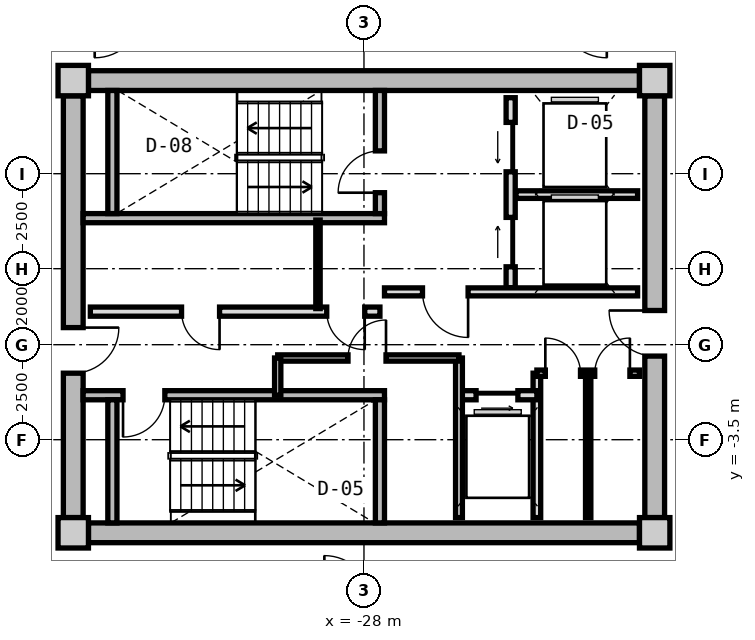
"""IFC4 building model, lengths in metres.
Left out: names, types, materials, properties, quantities, classifications, styles, units other than length and angle.
Written with IfcOpenShell. Run it as: python <this file> out.ifc"""

import sys

from ifc_helpers import new_model, si_unit, direction, frame, frame_2d, origin, origin_2d, place, context, subcontext, project, spatial, rectangle, extrude, source, transform, mapped, element, fill, save


model = new_model("IFC4")
c1 = context("Model", 3, precision=1e-05, world=origin(), true_north=direction((0.0, 1.0)))
c2 = subcontext(c1, "Body", "Model", "MODEL_VIEW")
j1 = project(units=[si_unit("LENGTHUNIT", "METRE"), si_unit("PLANEANGLEUNIT", "RADIAN")], contexts=[c1])
p1 = place(None, origin())
s1 = spatial("IfcSite", under=j1, at=p1, CompositionType="ELEMENT")
p2 = place(p1, origin())
s2 = spatial("IfcBuilding", under=s1, at=p2, CompositionType="ELEMENT")
p3 = place(p2, frame((0.0, 0.0, 241.35)))
s3 = spatial("IfcBuildingStorey", under=s2, at=p3, CompositionType="ELEMENT", Elevation=241.35)
m1 = source(origin(), c2, "Body", "SweptSolid", [
    extrude(rectangle(XDim=0.8, YDim=0.8, at=origin_2d()), origin(), (0.0, 0.0, 1.0), 3.05),
])
for number, where, z_axis, x_axis in (
    (1, (-35.65, -5.95, 0.0), (0.0, 0.0, 1.0), (1.0, 0.0, 0.0)),
    (2, (-20.35, -5.95, 0.0), (0.0, 0.0, 1.0), (1.0, 0.0, 0.0)),
    (3, (-20.35, 5.95, 0.0), (0.0, 0.0, 1.0), (1.0, 0.0, 0.0)),
    (4, (-35.65, 5.95, 0.0), (0.0, 0.0, 1.0), (1.0, 0.0, 0.0)),
):
    element("IfcColumn", number, at=place(p3, frame(where, z_axis=z_axis, x_axis=x_axis)), inside=s3, PredefinedType="COLUMN", context=c2, shape_type="MappedRepresentation", body=[
        mapped(m1, transform((0.0, 0.0, 0.0), x_axis=(1.0, 0.0, 0.0), y_axis=(0.0, 1.0, 0.0), z_axis=(0.0, 0.0, 1.0), scale=1.0)),
    ])
m2 = source(origin(), c2, "Body", "SweptSolid", [
    extrude(rectangle(XDim=14.5, YDim=0.52, at=frame_2d((7.25, 0.0))), origin(), (0.0, 0.0, 1.0), 2.73),
])
for number, where, z_axis, x_axis in (
    (5, (-35.25, 5.95, 0.0), (0.0, 0.0, 1.0), (1.0, 0.0, 0.0)),
    (6, (-20.75, -5.95, 0.0), (0.0, 0.0, 1.0), (-1.0, 0.0, 0.0)),
):
    element("IfcWall", number, at=place(p3, frame(where, z_axis=z_axis, x_axis=x_axis)), inside=s3, PredefinedType="SHEAR", context=c2, shape_type="MappedRepresentation", body=[
        mapped(m2, transform((0.0, 0.0, 0.0), x_axis=(1.0, 0.0, 0.0), y_axis=(0.0, 1.0, 0.0), z_axis=(0.0, 0.0, 1.0), scale=1.0)),
    ])
m3 = source(origin(), c2, "Body", "SweptSolid", [
    extrude(rectangle(XDim=11.1, YDim=0.52, at=frame_2d((5.55, 0.0))), origin(), (0.0, 0.0, 1.0), 2.73),
])
p4 = place(p3, frame((-35.65, -5.55, 0.0), z_axis=(0.0, 0.0, 1.0), x_axis=(0.0, 1.0, 0.0)))
e7 = element("IfcWall", 7, at=p4, inside=s3, PredefinedType="SHEAR", context=c2, shape_type="MappedRepresentation", body=[
    mapped(m3, transform((0.0, 0.0, 0.0), x_axis=(1.0, 0.0, 0.0), y_axis=(0.0, 1.0, 0.0), z_axis=(0.0, 0.0, 1.0), scale=1.0)),
])
p5 = place(p4, frame((3.8, 0.0, 0.0)))
e8 = element("IfcOpeningElement", 8, at=p5, cuts=e7, PredefinedType="OPENING", context=c2, shape_type="SweptSolid", body=[
    extrude(rectangle(XDim=1.2, YDim=2.15, at=frame_2d((0.6, 1.075))), frame((0.0, 0.27, 0.0), z_axis=(0.0, -1.0, 0.0), x_axis=(1.0, 0.0, 0.0)), (0.0, 0.0, 1.0), 0.54),
])
p6 = place(p3, frame((-20.35, 5.55, 0.0), z_axis=(0.0, 0.0, 1.0), x_axis=(0.0, -1.0, 0.0)))
e9 = element("IfcWall", 9, at=p6, inside=s3, PredefinedType="SHEAR", context=c2, shape_type="MappedRepresentation", body=[
    mapped(m3, transform((0.0, 0.0, 0.0), x_axis=(1.0, 0.0, 0.0), y_axis=(0.0, 1.0, 0.0), z_axis=(0.0, 0.0, 1.0), scale=1.0)),
])
p7 = place(p6, frame((5.65, 0.0, 0.0)))
e10 = element("IfcOpeningElement", 10, at=p7, cuts=e9, PredefinedType="OPENING", context=c2, shape_type="SweptSolid", body=[
    extrude(rectangle(XDim=1.2, YDim=2.15, at=frame_2d((0.6, 1.075))), frame((0.0, 0.27, 0.0), z_axis=(0.0, -1.0, 0.0), x_axis=(1.0, 0.0, 0.0)), (0.0, 0.0, 1.0), 0.54),
])
m4 = source(origin(), c2, "Body", "SweptSolid", [
    extrude(rectangle(XDim=7.93, YDim=0.24, at=frame_2d((3.965, 0.0))), origin(), (0.0, 0.0, 1.0), 2.73),
])
p8 = place(p3, frame((-35.39, 2.33, 0.0), z_axis=(0.0, 0.0, 1.0), x_axis=(1.0, 0.0, 0.0)))
e11 = element("IfcWall", 11, at=p8, inside=s3, PredefinedType="PARTITIONING", context=c2, shape_type="MappedRepresentation", body=[
    mapped(m4, transform((0.0, 0.0, 0.0), x_axis=(1.0, 0.0, 0.0), y_axis=(0.0, 1.0, 0.0), z_axis=(0.0, 0.0, 1.0), scale=1.0)),
])
m5 = source(origin(), c2, "Body", "SweptSolid", [
    extrude(rectangle(XDim=3.24, YDim=0.24, at=frame_2d((1.62, 0.0))), origin(), (0.0, 0.0, 1.0), 2.73),
])
p9 = place(p3, frame((-34.62, 2.45, 0.0), z_axis=(0.0, 0.0, 1.0), x_axis=(0.0, 1.0, 0.0)))
e12 = element("IfcWall", 12, at=p9, inside=s3, PredefinedType="PARTITIONING", context=c2, shape_type="MappedRepresentation", body=[
    mapped(m5, transform((0.0, 0.0, 0.0), x_axis=(1.0, 0.0, 0.0), y_axis=(0.0, 1.0, 0.0), z_axis=(0.0, 0.0, 1.0), scale=1.0)),
])
p10 = place(p3, frame((-27.58, 2.45, 0.0), z_axis=(0.0, 0.0, 1.0), x_axis=(0.0, 1.0, 0.0)))
e13 = element("IfcWall", 13, at=p10, inside=s3, PredefinedType="PARTITIONING", context=c2, shape_type="MappedRepresentation", body=[
    mapped(m5, transform((0.0, 0.0, 0.0), x_axis=(1.0, 0.0, 0.0), y_axis=(0.0, 1.0, 0.0), z_axis=(0.0, 0.0, 1.0), scale=1.0)),
])
p11 = place(p10, frame((0.55, 0.0, 0.0)))
e14 = element("IfcOpeningElement", 14, at=p11, cuts=e13, PredefinedType="OPENING", context=c2, shape_type="SweptSolid", body=[
    extrude(rectangle(XDim=1.1, YDim=2.15, at=frame_2d((0.55, 1.075))), frame((0.0, 0.13, 0.0), z_axis=(0.0, -1.0, 0.0), x_axis=(1.0, 0.0, 0.0)), (0.0, 0.0, 1.0), 0.26),
])
p12 = place(p3, frame((-35.39, -2.33, 0.0), z_axis=(0.0, 0.0, 1.0), x_axis=(1.0, 0.0, 0.0)))
e15 = element("IfcWall", 15, at=p12, inside=s3, PredefinedType="PARTITIONING", context=c2, shape_type="MappedRepresentation", body=[
    mapped(m4, transform((0.0, 0.0, 0.0), x_axis=(1.0, 0.0, 0.0), y_axis=(0.0, 1.0, 0.0), z_axis=(0.0, 0.0, 1.0), scale=1.0)),
])
p13 = place(p12, frame((1.05, 0.0, 0.0)))
e16 = element("IfcOpeningElement", 16, at=p13, cuts=e15, PredefinedType="OPENING", context=c2, shape_type="SweptSolid", body=[
    extrude(rectangle(XDim=1.1, YDim=2.15, at=frame_2d((0.55, 1.075))), frame((0.0, 0.13, 0.0), z_axis=(0.0, -1.0, 0.0), x_axis=(1.0, 0.0, 0.0)), (0.0, 0.0, 1.0), 0.26),
])
for number, where, z_axis, x_axis in (
    (17, (-34.62, -5.69, 0.0), (0.0, 0.0, 1.0), (0.0, 1.0, 0.0)),
    (18, (-27.58, -5.69, 0.0), (0.0, 0.0, 1.0), (0.0, 1.0, 0.0)),
):
    element("IfcWall", number, at=place(p3, frame(where, z_axis=z_axis, x_axis=x_axis)), inside=s3, PredefinedType="PARTITIONING", context=c2, shape_type="MappedRepresentation", body=[
        mapped(m5, transform((0.0, 0.0, 0.0), x_axis=(1.0, 0.0, 0.0), y_axis=(0.0, 1.0, 0.0), z_axis=(0.0, 0.0, 1.0), scale=1.0)),
    ])
m6 = source(origin(), c2, "Body", "SweptSolid", [
    extrude(rectangle(XDim=5.0, YDim=0.24, at=frame_2d((2.5, 0.0))), origin(), (0.0, 0.0, 1.0), 2.715),
])
p14 = place(p3, frame((-24.14, 0.5, 0.0), z_axis=(0.0, 0.0, 1.0), x_axis=(0.0, 1.0, 0.0)))
e19 = element("IfcWall", 19, at=p14, inside=s3, PredefinedType="PARTITIONING", context=c2, shape_type="MappedRepresentation", body=[
    mapped(m6, transform((0.0, 0.0, 0.0), x_axis=(1.0, 0.0, 0.0), y_axis=(0.0, 1.0, 0.0), z_axis=(0.0, 0.0, 1.0), scale=1.0)),
])
p15 = place(p14, frame((3.05, 0.0, 0.0)))
e20 = element("IfcOpeningElement", 20, at=p15, cuts=e19, PredefinedType="OPENING", context=c2, shape_type="SweptSolid", body=[
    extrude(rectangle(XDim=1.3, YDim=2.2, at=frame_2d((0.65, 1.1))), frame((0.0, 0.13, 0.0), z_axis=(0.0, -1.0, 0.0), x_axis=(1.0, 0.0, 0.0)), (0.0, 0.0, 1.0), 0.26),
])
p16 = place(p14, frame((0.55, 0.0, 0.0)))
e21 = element("IfcOpeningElement", 21, at=p16, cuts=e19, PredefinedType="OPENING", context=c2, shape_type="SweptSolid", body=[
    extrude(rectangle(XDim=1.3, YDim=2.2, at=frame_2d((0.65, 1.1))), frame((0.0, 0.13, 0.0), z_axis=(0.0, -1.0, 0.0), x_axis=(1.0, 0.0, 0.0)), (0.0, 0.0, 1.0), 0.26),
])
m7 = source(origin(), c2, "Body", "SweptSolid", [
    extrude(rectangle(XDim=3.2, YDim=0.2, at=frame_2d((1.6, 0.0))), origin(), (0.0, 0.0, 1.0), 2.715),
])
p17 = place(p3, frame((-24.0, 2.95, 0.0), z_axis=(0.0, 0.0, 1.0), x_axis=(1.0, 0.0, 0.0)))
e22 = element("IfcWall", 22, at=p17, inside=s3, PredefinedType="PARTITIONING", context=c2, shape_type="MappedRepresentation", body=[
    mapped(m7, transform((0.0, 0.0, 0.0), x_axis=(1.0, 0.0, 0.0), y_axis=(0.0, 1.0, 0.0), z_axis=(0.0, 0.0, 1.0), scale=1.0)),
])
m8 = source(origin(), c2, "Body", "SweptSolid", [
    extrude(rectangle(XDim=6.66, YDim=0.21, at=frame_2d((3.33, 0.0))), origin(), (0.0, 0.0, 1.0), 2.715),
])
p18 = place(p3, frame((-27.46, 0.39, 0.0), z_axis=(0.0, 0.0, 1.0), x_axis=(1.0, 0.0, 0.0)))
e23 = element("IfcWall", 23, at=p18, inside=s3, PredefinedType="PARTITIONING", context=c2, shape_type="MappedRepresentation", body=[
    mapped(m8, transform((0.0, 0.0, 0.0), x_axis=(1.0, 0.0, 0.0), y_axis=(0.0, 1.0, 0.0), z_axis=(0.0, 0.0, 1.0), scale=1.0)),
])
p19 = place(p18, frame((1.0, 0.0, 0.0)))
e24 = element("IfcOpeningElement", 24, at=p19, cuts=e23, PredefinedType="OPENING", context=c2, shape_type="SweptSolid", body=[
    extrude(rectangle(XDim=1.2, YDim=2.15, at=frame_2d((0.6, 1.075))), frame((0.0, 0.115, 0.0), z_axis=(0.0, -1.0, 0.0), x_axis=(1.0, 0.0, 0.0)), (0.0, 0.0, 1.0), 0.23),
])
m9 = source(origin(), c2, "Body", "SweptSolid", [
    extrude(rectangle(XDim=7.62, YDim=0.24, at=frame_2d((3.81, 0.0))), origin(), (0.0, 0.0, 1.0), 2.715),
])
p20 = place(p3, frame((-35.2, -0.13, 0.0), z_axis=(0.0, 0.0, 1.0), x_axis=(1.0, 0.0, 0.0)))
e25 = element("IfcWall", 25, at=p20, inside=s3, PredefinedType="PARTITIONING", context=c2, shape_type="MappedRepresentation", body=[
    mapped(m9, transform((0.0, 0.0, 0.0), x_axis=(1.0, 0.0, 0.0), y_axis=(0.0, 1.0, 0.0), z_axis=(0.0, 0.0, 1.0), scale=1.0)),
])
p21 = place(p20, frame((6.22, 0.0, 0.0)))
e26 = element("IfcOpeningElement", 26, at=p21, cuts=e25, PredefinedType="OPENING", context=c2, shape_type="SweptSolid", body=[
    extrude(rectangle(XDim=1.0, YDim=2.1, at=frame_2d((0.5, 1.05))), frame((0.0, 0.13, 0.0), z_axis=(0.0, -1.0, 0.0), x_axis=(1.0, 0.0, 0.0)), (0.0, 0.0, 1.0), 0.26),
])
p22 = place(p20, frame((2.4, 0.0, 0.0)))
e27 = element("IfcOpeningElement", 27, at=p22, cuts=e25, PredefinedType="OPENING", context=c2, shape_type="SweptSolid", body=[
    extrude(rectangle(XDim=1.0, YDim=2.1, at=frame_2d((0.5, 1.05))), frame((0.0, 0.13, 0.0), z_axis=(0.0, -1.0, 0.0), x_axis=(1.0, 0.0, 0.0)), (0.0, 0.0, 1.0), 0.26),
])
m10 = source(origin(), c2, "Body", "SweptSolid", [
    extrude(rectangle(XDim=2.33, YDim=0.115, at=frame_2d((1.165, 0.0))), origin(), (0.0, 0.0, 1.0), 2.715),
])
p23 = place(p3, frame((-29.21, -0.05, 0.0), z_axis=(0.0, 0.0, 1.0), x_axis=(0.0, 1.0, 0.0)))
e28 = element("IfcWall", 28, at=p23, inside=s3, PredefinedType="PARTITIONING", context=c2, shape_type="MappedRepresentation", body=[
    mapped(m10, transform((0.0, 0.0, 0.0), x_axis=(1.0, 0.0, 0.0), y_axis=(0.0, 1.0, 0.0), z_axis=(0.0, 0.0, 1.0), scale=1.0)),
])
m11 = source(origin(), c2, "Body", "SweptSolid", [
    extrude(rectangle(XDim=3.8, YDim=0.2, at=frame_2d((1.9, 0.0))), origin(), (0.0, 0.0, 1.0), 2.715),
])
p24 = place(p3, frame((-23.45, -5.55, 0.0), z_axis=(0.0, 0.0, 1.0), x_axis=(0.0, 1.0, 0.0)))
e29 = element("IfcWall", 29, at=p24, inside=s3, PredefinedType="PARTITIONING", context=c2, shape_type="MappedRepresentation", body=[
    mapped(m11, transform((0.0, 0.0, 0.0), x_axis=(1.0, 0.0, 0.0), y_axis=(0.0, 1.0, 0.0), z_axis=(0.0, 0.0, 1.0), scale=1.0)),
])
m12 = source(origin(), c2, "Body", "SweptSolid", [
    extrude(rectangle(XDim=2.05, YDim=0.24, at=frame_2d((1.025, 0.0))), origin(), (0.0, 0.0, 1.0), 2.715),
])
p25 = place(p3, frame((-25.5, -2.33, 0.0), z_axis=(0.0, 0.0, 1.0), x_axis=(1.0, 0.0, 0.0)))
e30 = element("IfcWall", 30, at=p25, inside=s3, PredefinedType="PARTITIONING", context=c2, shape_type="MappedRepresentation", body=[
    mapped(m12, transform((0.0, 0.0, 0.0), x_axis=(1.0, 0.0, 0.0), y_axis=(0.0, 1.0, 0.0), z_axis=(0.0, 0.0, 1.0), scale=1.0)),
])
p26 = place(p25, frame((0.45, 0.0, 0.0)))
e31 = element("IfcOpeningElement", 31, at=p26, cuts=e30, PredefinedType="OPENING", context=c2, shape_type="SweptSolid", body=[
    extrude(rectangle(XDim=1.1, YDim=2.2, at=frame_2d((0.55, 1.1))), frame((0.0, 0.13, 0.0), z_axis=(0.0, -1.0, 0.0), x_axis=(1.0, 0.0, 0.0)), (0.0, 0.0, 1.0), 0.26),
])
m13 = source(origin(), c2, "Body", "SweptSolid", [
    extrude(rectangle(XDim=4.2, YDim=0.18, at=frame_2d((2.1, 0.0))), origin(), (0.0, 0.0, 1.0), 2.715),
])
p27 = place(p3, frame((-25.5, -5.55, 0.0), z_axis=(0.0, 0.0, 1.0), x_axis=(0.0, 1.0, 0.0)))
e32 = element("IfcWall", 32, at=p27, inside=s3, PredefinedType="PARTITIONING", context=c2, shape_type="MappedRepresentation", body=[
    mapped(m13, transform((0.0, 0.0, 0.0), x_axis=(1.0, 0.0, 0.0), y_axis=(0.0, 1.0, 0.0), z_axis=(0.0, 0.0, 1.0), scale=1.0)),
])
m14 = source(origin(), c2, "Body", "SweptSolid", [
    extrude(rectangle(XDim=4.77, YDim=0.165, at=frame_2d((2.385, 0.0))), origin(), (0.0, 0.0, 1.0), 2.715),
])
p28 = place(p3, frame((-30.27, -1.35, 0.0), z_axis=(0.0, 0.0, 1.0), x_axis=(1.0, 0.0, 0.0)))
e33 = element("IfcWall", 33, at=p28, inside=s3, PredefinedType="PARTITIONING", context=c2, shape_type="MappedRepresentation", body=[
    mapped(m14, transform((0.0, 0.0, 0.0), x_axis=(1.0, 0.0, 0.0), y_axis=(0.0, 1.0, 0.0), z_axis=(0.0, 0.0, 1.0), scale=1.0)),
])
p29 = place(p28, frame((1.85, 0.0, 0.0)))
e34 = element("IfcOpeningElement", 34, at=p29, cuts=e33, PredefinedType="OPENING", context=c2, shape_type="SweptSolid", body=[
    extrude(rectangle(XDim=1.0, YDim=2.1, at=frame_2d((0.5, 1.05))), frame((0.0, 0.093, 0.0), z_axis=(0.0, -1.0, 0.0), x_axis=(1.0, 0.0, 0.0)), (0.0, 0.0, 1.0), 0.185),
])
m15 = source(origin(), c2, "Body", "SweptSolid", [
    extrude(rectangle(XDim=0.98, YDim=0.165, at=frame_2d((0.49, 0.0))), origin(), (0.0, 0.0, 1.0), 2.715),
])
p30 = place(p3, frame((-30.27, -2.33, 0.0), z_axis=(0.0, 0.0, 1.0), x_axis=(0.0, 1.0, 0.0)))
e35 = element("IfcWall", 35, at=p30, inside=s3, PredefinedType="PARTITIONING", context=c2, shape_type="MappedRepresentation", body=[
    mapped(m15, transform((0.0, 0.0, 0.0), x_axis=(1.0, 0.0, 0.0), y_axis=(0.0, 1.0, 0.0), z_axis=(0.0, 0.0, 1.0), scale=1.0)),
])
m16 = source(origin(), c2, "Body", "SweptSolid", [
    extrude(rectangle(XDim=2.7, YDim=0.165, at=frame_2d((1.35, 0.0))), origin(), (0.0, 0.0, 1.0), 2.715),
])
p31 = place(p3, frame((-23.45, -1.75, 0.0), z_axis=(0.0, 0.0, 1.0), x_axis=(1.0, 0.0, 0.0)))
e36 = element("IfcWall", 36, at=p31, inside=s3, PredefinedType="PARTITIONING", context=c2, shape_type="MappedRepresentation", body=[
    mapped(m16, transform((0.0, 0.0, 0.0), x_axis=(1.0, 0.0, 0.0), y_axis=(0.0, 1.0, 0.0), z_axis=(0.0, 0.0, 1.0), scale=1.0)),
])
p32 = place(p31, frame((0.222, 0.0, 0.0)))
e37 = element("IfcOpeningElement", 37, at=p32, cuts=e36, PredefinedType="OPENING", context=c2, shape_type="SweptSolid", body=[
    extrude(rectangle(XDim=0.925, YDim=2.1, at=frame_2d((0.462, 1.05))), frame((0.0, 0.093, 0.0), z_axis=(0.0, -1.0, 0.0), x_axis=(1.0, 0.0, 0.0)), (0.0, 0.0, 1.0), 0.185),
])
p33 = place(p31, frame((1.522, 0.0, 0.0)))
e38 = element("IfcOpeningElement", 38, at=p33, cuts=e36, PredefinedType="OPENING", context=c2, shape_type="SweptSolid", body=[
    extrude(rectangle(XDim=0.925, YDim=2.1, at=frame_2d((0.462, 1.05))), frame((0.0, 0.093, 0.0), z_axis=(0.0, -1.0, 0.0), x_axis=(1.0, 0.0, 0.0)), (0.0, 0.0, 1.0), 0.185),
])
m17 = source(origin(), c2, "Body", "SweptSolid", [
    extrude(rectangle(XDim=3.8, YDim=0.14, at=frame_2d((1.9, 0.0))), origin(), (0.0, 0.0, 1.0), 2.715),
])
p34 = place(p3, frame((-22.1, -5.55, 0.0), z_axis=(0.0, 0.0, 1.0), x_axis=(0.0, 1.0, 0.0)))
e39 = element("IfcWall", 39, at=p34, inside=s3, PredefinedType="PARTITIONING", context=c2, shape_type="MappedRepresentation", body=[
    mapped(m17, transform((0.0, 0.0, 0.0), x_axis=(1.0, 0.0, 0.0), y_axis=(0.0, 1.0, 0.0), z_axis=(0.0, 0.0, 1.0), scale=1.0)),
])
m18 = source(origin(), c2, "Body", "SweptSolid", [
    extrude(rectangle(XDim=1.1, YDim=2.15, at=frame_2d((0.55, 1.075))), frame((0.0, 0.025, 0.0), z_axis=(0.0, -1.0, 0.0), x_axis=(1.0, 0.0, 0.0)), (0.0, 0.0, 1.0), 0.05),
])
p35 = place(p11, origin())
e40 = element("IfcDoor", 40, at=p35, inside=s3, OperationType="SINGLE_SWING_LEFT", PredefinedType="DOOR", context=c2, shape_type="MappedRepresentation", body=[
    mapped(m18, transform((0.0, 0.0, 0.0), x_axis=(1.0, 0.0, 0.0), y_axis=(0.0, 1.0, 0.0), z_axis=(0.0, 0.0, 1.0), scale=1.0)),
])
fill(e14, e40)
p36 = place(p13, frame((1.1, 0.0, 0.0), z_axis=(0.0, 0.0, 1.0), x_axis=(-1.0, 0.0, 0.0)))
e41 = element("IfcDoor", 41, at=p36, inside=s3, OperationType="SINGLE_SWING_RIGHT", PredefinedType="DOOR", context=c2, shape_type="MappedRepresentation", body=[
    mapped(m18, transform((0.0, 0.0, 0.0), x_axis=(1.0, 0.0, 0.0), y_axis=(0.0, 1.0, 0.0), z_axis=(0.0, 0.0, 1.0), scale=1.0)),
])
fill(e16, e41)
m19 = source(origin(), c2, "Body", "SweptSolid", [
    extrude(rectangle(XDim=1.3, YDim=2.2, at=frame_2d((0.65, 1.1))), frame((0.0, 0.025, 0.0), z_axis=(0.0, -1.0, 0.0), x_axis=(1.0, 0.0, 0.0)), (0.0, 0.0, 1.0), 0.05),
])
p37 = place(p15, origin())
e42 = element("IfcDoor", 42, at=p37, inside=s3, OperationType="SLIDING_TO_LEFT", PredefinedType="DOOR", context=c2, shape_type="MappedRepresentation", body=[
    mapped(m19, transform((0.0, 0.0, 0.0), x_axis=(1.0, 0.0, 0.0), y_axis=(0.0, 1.0, 0.0), z_axis=(0.0, 0.0, 1.0), scale=1.0)),
])
fill(e20, e42)
p38 = place(p16, origin())
e43 = element("IfcDoor", 43, at=p38, inside=s3, OperationType="SLIDING_TO_RIGHT", PredefinedType="DOOR", context=c2, shape_type="MappedRepresentation", body=[
    mapped(m19, transform((0.0, 0.0, 0.0), x_axis=(1.0, 0.0, 0.0), y_axis=(0.0, 1.0, 0.0), z_axis=(0.0, 0.0, 1.0), scale=1.0)),
])
fill(e21, e43)
m20 = source(origin(), c2, "Body", "SweptSolid", [
    extrude(rectangle(XDim=1.2, YDim=2.15, at=frame_2d((0.6, 1.075))), frame((0.0, 0.025, 0.0), z_axis=(0.0, -1.0, 0.0), x_axis=(1.0, 0.0, 0.0)), (0.0, 0.0, 1.0), 0.05),
])
p39 = place(p19, frame((1.2, 0.0, 0.0), z_axis=(0.0, 0.0, 1.0), x_axis=(-1.0, 0.0, 0.0)))
e44 = element("IfcDoor", 44, at=p39, inside=s3, OperationType="SINGLE_SWING_LEFT", PredefinedType="DOOR", context=c2, shape_type="MappedRepresentation", body=[
    mapped(m20, transform((0.0, 0.0, 0.0), x_axis=(1.0, 0.0, 0.0), y_axis=(0.0, 1.0, 0.0), z_axis=(0.0, 0.0, 1.0), scale=1.0)),
])
fill(e24, e44)
p40 = place(p5, frame((1.2, 0.0, 0.0), z_axis=(0.0, 0.0, 1.0), x_axis=(-1.0, 0.0, 0.0)))
e45 = element("IfcDoor", 45, at=p40, inside=s3, OperationType="SINGLE_SWING_LEFT", PredefinedType="DOOR", context=c2, shape_type="MappedRepresentation", body=[
    mapped(m20, transform((0.0, 0.0, 0.0), x_axis=(1.0, 0.0, 0.0), y_axis=(0.0, 1.0, 0.0), z_axis=(0.0, 0.0, 1.0), scale=1.0)),
])
fill(e8, e45)
p41 = place(p7, frame((1.2, 0.0, 0.0), z_axis=(0.0, 0.0, 1.0), x_axis=(-1.0, 0.0, 0.0)))
e46 = element("IfcDoor", 46, at=p41, inside=s3, OperationType="SINGLE_SWING_RIGHT", PredefinedType="DOOR", context=c2, shape_type="MappedRepresentation", body=[
    mapped(m20, transform((0.0, 0.0, 0.0), x_axis=(1.0, 0.0, 0.0), y_axis=(0.0, 1.0, 0.0), z_axis=(0.0, 0.0, 1.0), scale=1.0)),
])
fill(e10, e46)
m21 = source(origin(), c2, "Body", "SweptSolid", [
    extrude(rectangle(XDim=1.0, YDim=2.1, at=frame_2d((0.5, 1.05))), frame((0.0, 0.025, 0.0), z_axis=(0.0, -1.0, 0.0), x_axis=(1.0, 0.0, 0.0)), (0.0, 0.0, 1.0), 0.05),
])
p42 = place(p21, frame((1.0, 0.0, 0.0), z_axis=(0.0, 0.0, 1.0), x_axis=(-1.0, 0.0, 0.0)))
e47 = element("IfcDoor", 47, at=p42, inside=s3, OperationType="SINGLE_SWING_LEFT", PredefinedType="DOOR", context=c2, shape_type="MappedRepresentation", body=[
    mapped(m21, transform((0.0, 0.0, 0.0), x_axis=(1.0, 0.0, 0.0), y_axis=(0.0, 1.0, 0.0), z_axis=(0.0, 0.0, 1.0), scale=1.0)),
])
fill(e26, e47)
p43 = place(p22, frame((1.0, 0.0, 0.0), z_axis=(0.0, 0.0, 1.0), x_axis=(-1.0, 0.0, 0.0)))
e48 = element("IfcDoor", 48, at=p43, inside=s3, OperationType="SINGLE_SWING_LEFT", PredefinedType="DOOR", context=c2, shape_type="MappedRepresentation", body=[
    mapped(m21, transform((0.0, 0.0, 0.0), x_axis=(1.0, 0.0, 0.0), y_axis=(0.0, 1.0, 0.0), z_axis=(0.0, 0.0, 1.0), scale=1.0)),
])
fill(e27, e48)
m22 = source(origin(), c2, "Body", "SweptSolid", [
    extrude(rectangle(XDim=1.1, YDim=2.2, at=frame_2d((0.55, 1.1))), frame((0.0, 0.025, 0.0), z_axis=(0.0, -1.0, 0.0), x_axis=(1.0, 0.0, 0.0)), (0.0, 0.0, 1.0), 0.05),
])
p44 = place(p26, frame((1.1, 0.0, 0.0), z_axis=(0.0, 0.0, 1.0), x_axis=(-1.0, 0.0, 0.0)))
e49 = element("IfcDoor", 49, at=p44, inside=s3, OperationType="SLIDING_TO_RIGHT", PredefinedType="DOOR", context=c2, shape_type="MappedRepresentation", body=[
    mapped(m22, transform((0.0, 0.0, 0.0), x_axis=(1.0, 0.0, 0.0), y_axis=(0.0, 1.0, 0.0), z_axis=(0.0, 0.0, 1.0), scale=1.0)),
])
fill(e31, e49)
p45 = place(p29, origin())
e50 = element("IfcDoor", 50, at=p45, inside=s3, OperationType="SINGLE_SWING_RIGHT", PredefinedType="DOOR", context=c2, shape_type="MappedRepresentation", body=[
    mapped(m21, transform((0.0, 0.0, 0.0), x_axis=(1.0, 0.0, 0.0), y_axis=(0.0, 1.0, 0.0), z_axis=(0.0, 0.0, 1.0), scale=1.0)),
])
fill(e34, e50)
m23 = source(origin(), c2, "Body", "SweptSolid", [
    extrude(rectangle(XDim=0.925, YDim=2.1, at=frame_2d((0.462, 1.05))), frame((0.0, 0.025, 0.0), z_axis=(0.0, -1.0, 0.0), x_axis=(1.0, 0.0, 0.0)), (0.0, 0.0, 1.0), 0.05),
])
p46 = place(p32, origin())
e51 = element("IfcDoor", 51, at=p46, inside=s3, OperationType="SINGLE_SWING_LEFT", PredefinedType="DOOR", context=c2, shape_type="MappedRepresentation", body=[
    mapped(m23, transform((0.0, 0.0, 0.0), x_axis=(1.0, 0.0, 0.0), y_axis=(0.0, 1.0, 0.0), z_axis=(0.0, 0.0, 1.0), scale=1.0)),
])
fill(e37, e51)
p47 = place(p33, origin())
e52 = element("IfcDoor", 52, at=p47, inside=s3, OperationType="SINGLE_SWING_RIGHT", PredefinedType="DOOR", context=c2, shape_type="MappedRepresentation", body=[
    mapped(m23, transform((0.0, 0.0, 0.0), x_axis=(1.0, 0.0, 0.0), y_axis=(0.0, 1.0, 0.0), z_axis=(0.0, 0.0, 1.0), scale=1.0)),
])
fill(e38, e52)
save(model, sys.argv[1])
